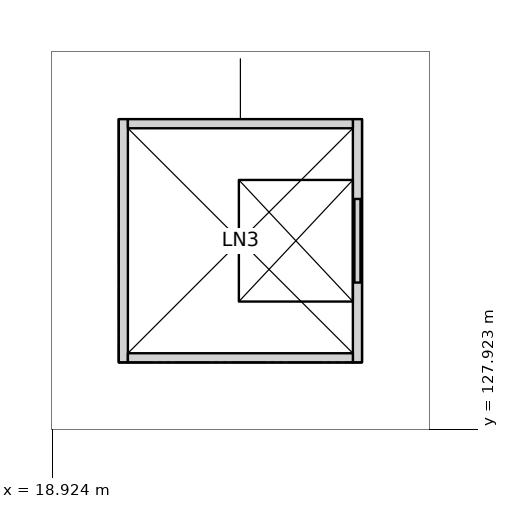
"""IFC4 building model, lengths in metres.
Left out: names, types, materials, properties, quantities, classifications, styles, units other than length and angle.
Written with IfcOpenShell. Run it as: python <this file> out.ifc"""

import sys

from ifc_helpers import new_model, si_unit, direction, frame, frame_2d, origin, place, context, subcontext, project, spatial, rectangle, extrude, element, fill, save


model = new_model("IFC4")
c1 = context("Model", 3, precision=1e-05, world=origin(), true_north=direction((0.0, 1.0)))
c2 = subcontext(c1, "Body", "Model", "MODEL_VIEW")
j1 = project(units=[si_unit("LENGTHUNIT", "METRE"), si_unit("PLANEANGLEUNIT", "RADIAN")], contexts=[c1])
p1 = place(None, origin())
s1 = spatial("IfcSite", under=j1, at=p1, CompositionType="ELEMENT")
p2 = place(p1, origin())
s2 = spatial("IfcBuilding", under=s1, at=p2, CompositionType="ELEMENT")
p3 = place(p2, frame((0.0, 0.0, 7.0)))
s3 = spatial("IfcBuildingStorey", under=s2, at=p3, CompositionType="ELEMENT", Elevation=7.0)
p4 = place(p3, frame((22.94, 128.8, 0.0), z_axis=(0.0, 0.0, 1.0), x_axis=(0.0, 1.0, 0.0)))
e1 = element("IfcWall", 1, at=p4, inside=s3, PredefinedType="PARTITIONING", context=c2, shape_type="SweptSolid", body=[
    extrude(rectangle(XDim=3.2, YDim=0.12, at=frame_2d((1.6, 0.0))), origin(), (0.0, 0.0, 1.0), 3.6),
])
p5 = place(p4, frame((1.05, 0.0, 0.0)))
e2 = element("IfcOpeningElement", 2, at=p5, cuts=e1, PredefinedType="OPENING", context=c2, shape_type="SweptSolid", body=[
    extrude(rectangle(XDim=1.1, YDim=2.1, at=frame_2d((0.55, 1.05))), frame((0.0, 0.07, 0.0), z_axis=(0.0, -1.0, 0.0), x_axis=(1.0, 0.0, 0.0)), (0.0, 0.0, 1.0), 0.14),
])
p6 = place(p3, frame((19.86, 128.8, 0.0), z_axis=(0.0, 0.0, 1.0), x_axis=(0.0, 1.0, 0.0)))
e3 = element("IfcWall", 3, at=p6, inside=s3, PredefinedType="PARTITIONING", context=c2, shape_type="SweptSolid", body=[
    extrude(rectangle(XDim=3.2, YDim=0.12, at=frame_2d((1.6, 0.0))), origin(), (0.0, 0.0, 1.0), 3.6),
])
for number, where, z_axis, x_axis in (
    (4, (19.92, 128.86, 0.0), (0.0, 0.0, 1.0), (1.0, 0.0, 0.0)),
    (5, (19.92, 131.94, 0.0), (0.0, 0.0, 1.0), (1.0, 0.0, 0.0)),
):
    element("IfcWall", number, at=place(p3, frame(where, z_axis=z_axis, x_axis=x_axis)), inside=s3, PredefinedType="PARTITIONING", context=c2, shape_type="SweptSolid", body=[
        extrude(rectangle(XDim=2.96, YDim=0.12, at=frame_2d((1.48, 0.0))), origin(), (0.0, 0.0, 1.0), 3.6),
    ])
p7 = place(p5, origin())
e6 = element("IfcDoor", 6, at=p7, inside=s3, OperationType="DOUBLE_DOOR_SLIDING", PredefinedType="DOOR", context=c2, shape_type="SweptSolid", body=[
    extrude(rectangle(XDim=1.1, YDim=2.1, at=frame_2d((0.55, 1.05))), frame((0.0, 0.025, 0.0), z_axis=(0.0, -1.0, 0.0), x_axis=(1.0, 0.0, 0.0)), (0.0, 0.0, 1.0), 0.05),
])
fill(e2, e6)
save(model, sys.argv[1])
